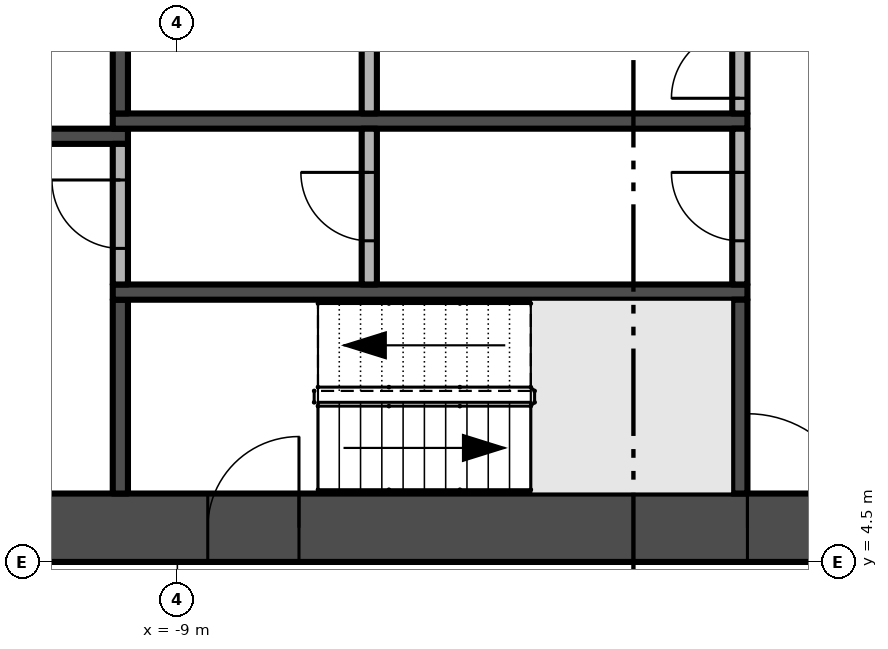
"""IFC4 building model, lengths in metres.
Left out: names, types, materials, properties, quantities, classifications, styles, units other than length and angle.
Written with IfcOpenShell. Run it as: python <this file> out.ifc"""

import sys

from ifc_helpers import new_model, si_unit, direction, frame, frame_2d, origin, place, context, subcontext, project, spatial, rectangle, extrude, element, fill, save


model = new_model("IFC4")
c1 = context("Model", 3, precision=1e-05, world=origin(), true_north=direction((0.0, 1.0)))
c2 = subcontext(c1, "Body", "Model", "MODEL_VIEW")
j1 = project(units=[si_unit("LENGTHUNIT", "METRE"), si_unit("PLANEANGLEUNIT", "RADIAN")], contexts=[c1])
p1 = place(None, origin())
s1 = spatial("IfcSite", under=j1, at=p1, CompositionType="ELEMENT")
p2 = place(p1, origin())
s2 = spatial("IfcBuilding", under=s1, at=p2, CompositionType="ELEMENT")
p3 = place(p2, frame((0.0, 0.0, 88.4)))
s3 = spatial("IfcBuildingStorey", under=s2, at=p3, CompositionType="ELEMENT", Elevation=88.4)
p4 = place(p3, frame((-13.5, 4.95, -0.3), z_axis=(0.0, 0.0, 1.0), x_axis=(1.0, 0.0, 0.0)))
e1 = element("IfcWall", 1, at=p4, inside=s3, PredefinedType="SHEAR", context=c2, shape_type="SweptSolid", body=[
    extrude(rectangle(XDim=27.0, YDim=0.9, at=frame_2d((13.5, 0.0))), origin(), (0.0, 0.0, 1.0), 3.8),
])
p5 = place(p4, frame((12.0, 0.0, 0.3)))
e2 = element("IfcOpeningElement", 2, at=p5, cuts=e1, PredefinedType="OPENING", context=c2, shape_type="SweptSolid", body=[
    extrude(rectangle(XDim=3.0, YDim=2.4, at=frame_2d((1.5, 1.2))), frame((0.0, 0.46, 0.0), z_axis=(0.0, -1.0, 0.0), x_axis=(1.0, 0.0, 0.0)), (0.0, 0.0, 1.0), 0.92),
])
p6 = place(p4, frame((4.9, 0.0, 0.3)))
e3 = element("IfcOpeningElement", 3, at=p6, cuts=e1, PredefinedType="OPENING", context=c2, shape_type="SweptSolid", body=[
    extrude(rectangle(XDim=1.2, YDim=2.2, at=frame_2d((0.6, 1.1))), frame((0.0, 0.46, 0.0), z_axis=(0.0, -1.0, 0.0), x_axis=(1.0, 0.0, 0.0)), (0.0, 0.0, 1.0), 0.92),
])
p7 = place(p4, frame((20.75, 0.0, 0.3)))
e4 = element("IfcOpeningElement", 4, at=p7, cuts=e1, PredefinedType="OPENING", context=c2, shape_type="SweptSolid", body=[
    extrude(rectangle(XDim=1.5, YDim=2.2, at=frame_2d((0.75, 1.1))), frame((0.0, 0.46, 0.0), z_axis=(0.0, -1.0, 0.0), x_axis=(1.0, 0.0, 0.0)), (0.0, 0.0, 1.0), 0.92),
])
p8 = place(p4, frame((17.4, 0.0, 0.3)))
e5 = element("IfcOpeningElement", 5, at=p8, cuts=e1, PredefinedType="OPENING", context=c2, shape_type="SweptSolid", body=[
    extrude(rectangle(XDim=1.2, YDim=2.2, at=frame_2d((0.6, 1.1))), frame((0.0, 0.46, 0.0), z_axis=(0.0, -1.0, 0.0), x_axis=(1.0, 0.0, 0.0)), (0.0, 0.0, 1.0), 0.92),
])
p9 = place(p3, frame((-12.6, 10.1, 0.0), z_axis=(0.0, 0.0, 1.0), x_axis=(1.0, 0.0, 0.0)))
e6 = element("IfcWall", 6, at=p9, inside=s3, PredefinedType="SHEAR", context=c2, shape_type="SweptSolid", body=[
    extrude(rectangle(XDim=2.95, YDim=0.2, at=frame_2d((1.475, 0.0))), origin(), (0.0, 0.0, 1.0), 3.5),
])
p10 = place(p3, frame((-9.75, 5.4, 0.0), z_axis=(0.0, 0.0, 1.0), x_axis=(0.0, 1.0, 0.0)))
e7 = element("IfcWall", 7, at=p10, inside=s3, PredefinedType="SHEAR", context=c2, shape_type="SweptSolid", body=[
    extrude(rectangle(XDim=2.55, YDim=0.2, at=frame_2d((1.275, 0.0))), origin(), (0.0, 0.0, 1.0), 3.5),
])
p11 = place(p3, frame((-9.85, 8.05, 0.0), z_axis=(0.0, 0.0, 1.0), x_axis=(1.0, 0.0, 0.0)))
e8 = element("IfcWall", 8, at=p11, inside=s3, PredefinedType="SHEAR", context=c2, shape_type="SweptSolid", body=[
    extrude(rectangle(XDim=8.35, YDim=0.2, at=frame_2d((4.175, 0.0))), origin(), (0.0, 0.0, 1.0), 3.5),
])
p12 = place(p3, frame((-9.75, 8.15, 0.0), z_axis=(0.0, 0.0, 1.0), x_axis=(0.0, 1.0, 0.0)))
e9 = element("IfcWall", 9, at=p12, inside=s3, PredefinedType="PARTITIONING", context=c2, shape_type="SweptSolid", body=[
    extrude(rectangle(XDim=1.85, YDim=0.2, at=frame_2d((0.925, 0.0))), origin(), (0.0, 0.0, 1.0), 3.5),
])
p13 = place(p12, frame((0.475, 0.0, 0.0)))
e10 = element("IfcOpeningElement", 10, at=p13, cuts=e9, PredefinedType="OPENING", context=c2, shape_type="SweptSolid", body=[
    extrude(rectangle(XDim=0.9, YDim=2.1, at=frame_2d((0.45, 1.05))), frame((0.0, 0.11, 0.0), z_axis=(0.0, -1.0, 0.0), x_axis=(1.0, 0.0, 0.0)), (0.0, 0.0, 1.0), 0.22),
])
p14 = place(p3, frame((-9.85, 10.3, 0.0), z_axis=(0.0, 0.0, 1.0), x_axis=(1.0, 0.0, 0.0)))
e11 = element("IfcWall", 11, at=p14, inside=s3, PredefinedType="SHEAR", context=c2, shape_type="SweptSolid", body=[
    extrude(rectangle(XDim=8.35, YDim=0.2, at=frame_2d((4.175, 0.0))), origin(), (0.0, 0.0, 1.0), 3.5),
])
p15 = place(p3, frame((-9.75, 10.4, 0.0), z_axis=(0.0, 0.0, 1.0), x_axis=(0.0, 1.0, 0.0)))
e12 = element("IfcWall", 12, at=p15, inside=s3, PredefinedType="SHEAR", context=c2, shape_type="SweptSolid", body=[
    extrude(rectangle(XDim=5.5, YDim=0.2, at=frame_2d((2.75, 0.0))), origin(), (0.0, 0.0, 1.0), 3.5),
])
p16 = place(p3, frame((-6.475, 8.15, 0.0), z_axis=(0.0, 0.0, 1.0), x_axis=(0.0, 1.0, 0.0)))
e13 = element("IfcWall", 13, at=p16, inside=s3, PredefinedType="PARTITIONING", context=c2, shape_type="SweptSolid", body=[
    extrude(rectangle(XDim=2.05, YDim=0.2, at=frame_2d((1.025, 0.0))), origin(), (0.0, 0.0, 1.0), 3.5),
])
p17 = place(p16, frame((0.575, 0.0, 0.0)))
e14 = element("IfcOpeningElement", 14, at=p17, cuts=e13, PredefinedType="OPENING", context=c2, shape_type="SweptSolid", body=[
    extrude(rectangle(XDim=0.9, YDim=2.1, at=frame_2d((0.45, 1.05))), frame((0.0, 0.11, 0.0), z_axis=(0.0, -1.0, 0.0), x_axis=(1.0, 0.0, 0.0)), (0.0, 0.0, 1.0), 0.22),
])
p18 = place(p3, frame((-6.475, 10.4, 0.0), z_axis=(0.0, 0.0, 1.0), x_axis=(0.0, 1.0, 0.0)))
e15 = element("IfcWall", 15, at=p18, inside=s3, PredefinedType="PARTITIONING", context=c2, shape_type="SweptSolid", body=[
    extrude(rectangle(XDim=1.35, YDim=0.2, at=frame_2d((0.675, 0.0))), origin(), (0.0, 0.0, 1.0), 3.5),
])
p19 = place(p3, frame((-1.6, 5.4, 0.0), z_axis=(0.0, 0.0, 1.0), x_axis=(0.0, 1.0, 0.0)))
e16 = element("IfcWall", 16, at=p19, inside=s3, PredefinedType="SHEAR", context=c2, shape_type="SweptSolid", body=[
    extrude(rectangle(XDim=2.55, YDim=0.2, at=frame_2d((1.275, 0.0))), origin(), (0.0, 0.0, 1.0), 3.5),
])
p20 = place(p3, frame((-1.6, 8.15, 0.0), z_axis=(0.0, 0.0, 1.0), x_axis=(0.0, 1.0, 0.0)))
e17 = element("IfcWall", 17, at=p20, inside=s3, PredefinedType="PARTITIONING", context=c2, shape_type="SweptSolid", body=[
    extrude(rectangle(XDim=2.05, YDim=0.2, at=frame_2d((1.025, 0.0))), origin(), (0.0, 0.0, 1.0), 3.5),
])
p21 = place(p20, frame((0.575, 0.0, 0.0)))
e18 = element("IfcOpeningElement", 18, at=p21, cuts=e17, PredefinedType="OPENING", context=c2, shape_type="SweptSolid", body=[
    extrude(rectangle(XDim=0.9, YDim=2.1, at=frame_2d((0.45, 1.05))), frame((0.0, 0.11, 0.0), z_axis=(0.0, -1.0, 0.0), x_axis=(1.0, 0.0, 0.0)), (0.0, 0.0, 1.0), 0.22),
])
p22 = place(p3, frame((-1.6, 10.4, 0.0), z_axis=(0.0, 0.0, 1.0), x_axis=(0.0, 1.0, 0.0)))
e19 = element("IfcWall", 19, at=p22, inside=s3, PredefinedType="PARTITIONING", context=c2, shape_type="SweptSolid", body=[
    extrude(rectangle(XDim=1.35, YDim=0.2, at=frame_2d((0.675, 0.0))), origin(), (0.0, 0.0, 1.0), 3.5),
])
p23 = place(p22, frame((0.2, 0.0, 0.0)))
e20 = element("IfcOpeningElement", 20, at=p23, cuts=e19, PredefinedType="OPENING", context=c2, shape_type="SweptSolid", body=[
    extrude(rectangle(XDim=0.9, YDim=2.1, at=frame_2d((0.45, 1.05))), frame((0.0, 0.11, 0.0), z_axis=(0.0, -1.0, 0.0), x_axis=(1.0, 0.0, 0.0)), (0.0, 0.0, 1.0), 0.22),
])
p24 = place(p5, frame((3.0, 0.0, 0.0), z_axis=(0.0, 0.0, 1.0), x_axis=(-1.0, 0.0, 0.0)))
e21 = element("IfcDoor", 21, at=p24, inside=s3, OperationType="DOUBLE_DOOR_SINGLE_SWING", PredefinedType="DOOR", context=c2, shape_type="SweptSolid", body=[
    extrude(rectangle(XDim=3.0, YDim=2.4, at=frame_2d((1.5, 1.2))), frame((0.0, 0.025, 0.0), z_axis=(0.0, -1.0, 0.0), x_axis=(1.0, 0.0, 0.0)), (0.0, 0.0, 1.0), 0.05),
])
fill(e2, e21)
p25 = place(p6, frame((1.2, 0.0, 0.0), z_axis=(0.0, 0.0, 1.0), x_axis=(-1.0, 0.0, 0.0)))
e22 = element("IfcDoor", 22, at=p25, inside=s3, OperationType="SINGLE_SWING_LEFT", PredefinedType="DOOR", context=c2, shape_type="SweptSolid", body=[
    extrude(rectangle(XDim=1.2, YDim=2.2, at=frame_2d((0.6, 1.1))), frame((0.0, 0.025, 0.0), z_axis=(0.0, -1.0, 0.0), x_axis=(1.0, 0.0, 0.0)), (0.0, 0.0, 1.0), 0.05),
])
fill(e3, e22)
p26 = place(p21, origin())
e23 = element("IfcDoor", 23, at=p26, inside=s3, OperationType="SINGLE_SWING_RIGHT", PredefinedType="DOOR", context=c2, shape_type="SweptSolid", body=[
    extrude(rectangle(XDim=0.9, YDim=2.1, at=frame_2d((0.45, 1.05))), frame((0.0, 0.025, 0.0), z_axis=(0.0, -1.0, 0.0), x_axis=(1.0, 0.0, 0.0)), (0.0, 0.0, 1.0), 0.05),
])
fill(e18, e23)
p27 = place(p23, origin())
e24 = element("IfcDoor", 24, at=p27, inside=s3, OperationType="SINGLE_SWING_LEFT", PredefinedType="DOOR", context=c2, shape_type="SweptSolid", body=[
    extrude(rectangle(XDim=0.9, YDim=2.1, at=frame_2d((0.45, 1.05))), frame((0.0, 0.025, 0.0), z_axis=(0.0, -1.0, 0.0), x_axis=(1.0, 0.0, 0.0)), (0.0, 0.0, 1.0), 0.05),
])
fill(e20, e24)
p28 = place(p17, origin())
e25 = element("IfcDoor", 25, at=p28, inside=s3, OperationType="SINGLE_SWING_RIGHT", PredefinedType="DOOR", context=c2, shape_type="SweptSolid", body=[
    extrude(rectangle(XDim=0.9, YDim=2.1, at=frame_2d((0.45, 1.05))), frame((0.0, 0.025, 0.0), z_axis=(0.0, -1.0, 0.0), x_axis=(1.0, 0.0, 0.0)), (0.0, 0.0, 1.0), 0.05),
])
fill(e14, e25)
p29 = place(p13, origin())
e26 = element("IfcDoor", 26, at=p29, inside=s3, OperationType="SINGLE_SWING_RIGHT", PredefinedType="DOOR", context=c2, shape_type="SweptSolid", body=[
    extrude(rectangle(XDim=0.9, YDim=2.1, at=frame_2d((0.45, 1.05))), frame((0.0, 0.025, 0.0), z_axis=(0.0, -1.0, 0.0), x_axis=(1.0, 0.0, 0.0)), (0.0, 0.0, 1.0), 0.05),
])
fill(e10, e26)
save(model, sys.argv[1])
